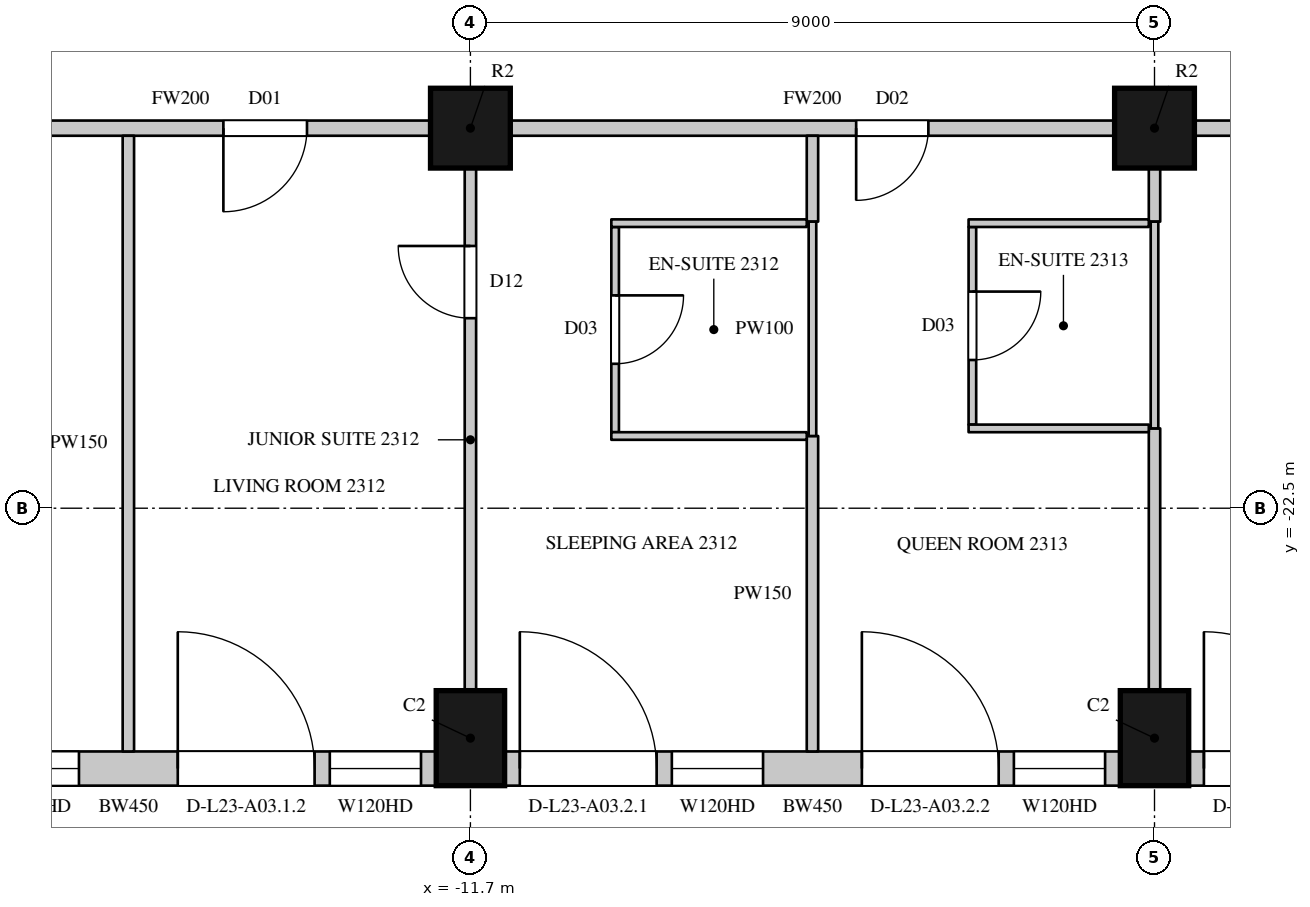
"""IFC4 building model, lengths in metres.
Left out: names, types, materials, properties, quantities, classifications, styles, units other than length and angle.
Written with IfcOpenShell. Run it as: python <this file> out.ifc"""

import sys

from ifc_helpers import new_model, si_unit, direction, frame, frame_2d, origin, origin_2d, place, context, subcontext, project, spatial, rectangle, circle, extrude, element, fill, save


model = new_model("IFC4")
c1 = context("Model", 3, precision=1e-05, world=origin(), true_north=direction((0.0, 1.0)))
c2 = subcontext(c1, "Body", "Model", "MODEL_VIEW")
j1 = project(units=[si_unit("LENGTHUNIT", "METRE"), si_unit("PLANEANGLEUNIT", "RADIAN")], contexts=[c1])
p1 = place(None, origin())
s1 = spatial("IfcSite", under=j1, at=p1, CompositionType="ELEMENT")
p2 = place(p1, origin())
s2 = spatial("IfcBuilding", under=s1, at=p2, CompositionType="ELEMENT")
p3 = place(p2, frame((0.0, 0.0, 113.1)))
s3 = spatial("IfcBuildingStorey", under=s2, at=p3, CompositionType="ELEMENT", Elevation=113.1)
for number, where, z_axis, x_axis in (
    (1, (-11.7, -25.525, 0.0), (0.0, 0.0, 1.0), (1.0, 0.0, 0.0)),
    (2, (-2.7, -25.525, 0.0), (0.0, 0.0, 1.0), (1.0, 0.0, 0.0)),
):
    element("IfcColumn", number, at=place(p3, frame(where, z_axis=z_axis, x_axis=x_axis)), inside=s3, PredefinedType="COLUMN", context=c2, shape_type="SweptSolid", body=[
        extrude(rectangle(XDim=0.9, YDim=1.25, at=origin_2d()), origin(), (0.0, 0.0, 1.0), 3.6),
    ])
for number, where, z_axis, x_axis in (
    (3, (-11.7, -17.5, 0.0), (0.0, 0.0, 1.0), (1.0, 0.0, 0.0)),
    (4, (-2.7, -17.5, 0.0), (0.0, 0.0, 1.0), (1.0, 0.0, 0.0)),
):
    element("IfcColumn", number, at=place(p3, frame(where, z_axis=z_axis, x_axis=x_axis)), inside=s3, PredefinedType="COLUMN", context=c2, shape_type="SweptSolid", body=[
        extrude(circle(Radius=0.525, at=origin_2d()), origin(), (0.0, 0.0, 1.0), 3.6),
    ])
p4 = place(p3, frame((-20.25, -25.925, 0.0), z_axis=(0.0, 0.0, 1.0), x_axis=(1.0, 0.0, 0.0)))
e5 = element("IfcWall", 5, at=p4, inside=s3, PredefinedType="SOLIDWALL", context=c2, shape_type="SweptSolid", body=[
    extrude(rectangle(XDim=8.1, YDim=0.45, at=frame_2d((4.05, 0.0))), origin(), (0.0, 0.0, 1.0), 3.3),
])
p5 = place(p4, frame((0.2, 0.0, 0.0)))
e6 = element("IfcOpeningElement", 6, at=p5, cuts=e5, PredefinedType="OPENING", context=c2, shape_type="SweptSolid", body=[
    extrude(rectangle(XDim=1.8, YDim=2.4, at=frame_2d((0.9, 1.2))), frame((0.0, 0.235, 0.0), z_axis=(0.0, -1.0, 0.0), x_axis=(1.0, 0.0, 0.0)), (0.0, 0.0, 1.0), 0.47),
])
p6 = place(p4, frame((2.2, 0.0, 1.05)))
e7 = element("IfcOpeningElement", 7, at=p6, cuts=e5, PredefinedType="OPENING", context=c2, shape_type="SweptSolid", body=[
    extrude(rectangle(XDim=1.2, YDim=2.0, at=frame_2d((0.6, 1.0))), frame((0.0, 0.235, 0.0), z_axis=(0.0, -1.0, 0.0), x_axis=(1.0, 0.0, 0.0)), (0.0, 0.0, 1.0), 0.47),
])
p7 = place(p4, frame((4.7, 0.0, 0.0)))
e8 = element("IfcOpeningElement", 8, at=p7, cuts=e5, PredefinedType="OPENING", context=c2, shape_type="SweptSolid", body=[
    extrude(rectangle(XDim=1.8, YDim=2.4, at=frame_2d((0.9, 1.2))), frame((0.0, 0.235, 0.0), z_axis=(0.0, -1.0, 0.0), x_axis=(1.0, 0.0, 0.0)), (0.0, 0.0, 1.0), 0.47),
])
p8 = place(p4, frame((6.7, 0.0, 1.05)))
e9 = element("IfcOpeningElement", 9, at=p8, cuts=e5, PredefinedType="OPENING", context=c2, shape_type="SweptSolid", body=[
    extrude(rectangle(XDim=1.2, YDim=2.0, at=frame_2d((0.6, 1.0))), frame((0.0, 0.235, 0.0), z_axis=(0.0, -1.0, 0.0), x_axis=(1.0, 0.0, 0.0)), (0.0, 0.0, 1.0), 0.47),
])
p9 = place(p3, frame((-11.25, -25.925, 0.0), z_axis=(0.0, 0.0, 1.0), x_axis=(1.0, 0.0, 0.0)))
e10 = element("IfcWall", 10, at=p9, inside=s3, PredefinedType="SOLIDWALL", context=c2, shape_type="SweptSolid", body=[
    extrude(rectangle(XDim=8.1, YDim=0.45, at=frame_2d((4.05, 0.0))), origin(), (0.0, 0.0, 1.0), 3.3),
])
p10 = place(p9, frame((0.2, 0.0, 0.0)))
e11 = element("IfcOpeningElement", 11, at=p10, cuts=e10, PredefinedType="OPENING", context=c2, shape_type="SweptSolid", body=[
    extrude(rectangle(XDim=1.8, YDim=2.4, at=frame_2d((0.9, 1.2))), frame((0.0, 0.235, 0.0), z_axis=(0.0, -1.0, 0.0), x_axis=(1.0, 0.0, 0.0)), (0.0, 0.0, 1.0), 0.47),
])
p11 = place(p9, frame((2.2, 0.0, 1.05)))
e12 = element("IfcOpeningElement", 12, at=p11, cuts=e10, PredefinedType="OPENING", context=c2, shape_type="SweptSolid", body=[
    extrude(rectangle(XDim=1.2, YDim=2.0, at=frame_2d((0.6, 1.0))), frame((0.0, 0.235, 0.0), z_axis=(0.0, -1.0, 0.0), x_axis=(1.0, 0.0, 0.0)), (0.0, 0.0, 1.0), 0.47),
])
p12 = place(p9, frame((4.7, 0.0, 0.0)))
e13 = element("IfcOpeningElement", 13, at=p12, cuts=e10, PredefinedType="OPENING", context=c2, shape_type="SweptSolid", body=[
    extrude(rectangle(XDim=1.8, YDim=2.4, at=frame_2d((0.9, 1.2))), frame((0.0, 0.235, 0.0), z_axis=(0.0, -1.0, 0.0), x_axis=(1.0, 0.0, 0.0)), (0.0, 0.0, 1.0), 0.47),
])
p13 = place(p9, frame((6.7, 0.0, 1.05)))
e14 = element("IfcOpeningElement", 14, at=p13, cuts=e10, PredefinedType="OPENING", context=c2, shape_type="SweptSolid", body=[
    extrude(rectangle(XDim=1.2, YDim=2.0, at=frame_2d((0.6, 1.0))), frame((0.0, 0.235, 0.0), z_axis=(0.0, -1.0, 0.0), x_axis=(1.0, 0.0, 0.0)), (0.0, 0.0, 1.0), 0.47),
])
p14 = place(p3, frame((-2.25, -25.925, 0.0), z_axis=(0.0, 0.0, 1.0), x_axis=(1.0, 0.0, 0.0)))
e15 = element("IfcWall", 15, at=p14, inside=s3, PredefinedType="SOLIDWALL", context=c2, shape_type="SweptSolid", body=[
    extrude(rectangle(XDim=8.1, YDim=0.45, at=frame_2d((4.05, 0.0))), origin(), (0.0, 0.0, 1.0), 3.3),
])
p15 = place(p14, frame((0.2, 0.0, 0.0)))
e16 = element("IfcOpeningElement", 16, at=p15, cuts=e15, PredefinedType="OPENING", context=c2, shape_type="SweptSolid", body=[
    extrude(rectangle(XDim=1.8, YDim=2.4, at=frame_2d((0.9, 1.2))), frame((0.0, 0.235, 0.0), z_axis=(0.0, -1.0, 0.0), x_axis=(1.0, 0.0, 0.0)), (0.0, 0.0, 1.0), 0.47),
])
p16 = place(p14, frame((2.2, 0.0, 1.05)))
e17 = element("IfcOpeningElement", 17, at=p16, cuts=e15, PredefinedType="OPENING", context=c2, shape_type="SweptSolid", body=[
    extrude(rectangle(XDim=1.2, YDim=2.0, at=frame_2d((0.6, 1.0))), frame((0.0, 0.235, 0.0), z_axis=(0.0, -1.0, 0.0), x_axis=(1.0, 0.0, 0.0)), (0.0, 0.0, 1.0), 0.47),
])
p17 = place(p14, frame((4.7, 0.0, 0.0)))
e18 = element("IfcOpeningElement", 18, at=p17, cuts=e15, PredefinedType="OPENING", context=c2, shape_type="SweptSolid", body=[
    extrude(rectangle(XDim=1.8, YDim=2.4, at=frame_2d((0.9, 1.2))), frame((0.0, 0.235, 0.0), z_axis=(0.0, -1.0, 0.0), x_axis=(1.0, 0.0, 0.0)), (0.0, 0.0, 1.0), 0.47),
])
p18 = place(p14, frame((6.7, 0.0, 1.05)))
e19 = element("IfcOpeningElement", 19, at=p18, cuts=e15, PredefinedType="OPENING", context=c2, shape_type="SweptSolid", body=[
    extrude(rectangle(XDim=1.2, YDim=2.0, at=frame_2d((0.6, 1.0))), frame((0.0, 0.235, 0.0), z_axis=(0.0, -1.0, 0.0), x_axis=(1.0, 0.0, 0.0)), (0.0, 0.0, 1.0), 0.47),
])
p19 = place(p3, frame((-18.8, -17.5, 0.0), z_axis=(0.0, 0.0, 1.0), x_axis=(1.0, 0.0, 0.0)))
e20 = element("IfcWall", 20, at=p19, inside=s3, PredefinedType="PARTITIONING", context=c2, shape_type="SweptSolid", body=[
    extrude(rectangle(XDim=6.575, YDim=0.2, at=frame_2d((3.288, 0.0))), origin(), (0.0, 0.0, 1.0), 2.75),
])
p20 = place(p19, frame((3.85, 0.0, 0.0)))
e21 = element("IfcOpeningElement", 21, at=p20, cuts=e20, PredefinedType="OPENING", context=c2, shape_type="SweptSolid", body=[
    extrude(rectangle(XDim=1.1, YDim=2.4, at=frame_2d((0.55, 1.2))), frame((0.0, 0.11, 0.0), z_axis=(0.0, -1.0, 0.0), x_axis=(1.0, 0.0, 0.0)), (0.0, 0.0, 1.0), 0.22),
])
p21 = place(p3, frame((-11.175, -17.5, 0.0), z_axis=(0.0, 0.0, 1.0), x_axis=(1.0, 0.0, 0.0)))
e22 = element("IfcWall", 22, at=p21, inside=s3, PredefinedType="PARTITIONING", context=c2, shape_type="SweptSolid", body=[
    extrude(rectangle(XDim=7.95, YDim=0.2, at=frame_2d((3.975, 0.0))), origin(), (0.0, 0.0, 1.0), 2.75),
])
p22 = place(p21, frame((4.55, 0.0, 0.0)))
e23 = element("IfcOpeningElement", 23, at=p22, cuts=e22, PredefinedType="OPENING", context=c2, shape_type="SweptSolid", body=[
    extrude(rectangle(XDim=0.95, YDim=2.2, at=frame_2d((0.475, 1.1))), frame((0.0, 0.11, 0.0), z_axis=(0.0, -1.0, 0.0), x_axis=(1.0, 0.0, 0.0)), (0.0, 0.0, 1.0), 0.22),
])
p23 = place(p3, frame((-2.175, -17.5, 0.0), z_axis=(0.0, 0.0, 1.0), x_axis=(1.0, 0.0, 0.0)))
e24 = element("IfcWall", 24, at=p23, inside=s3, PredefinedType="PARTITIONING", context=c2, shape_type="SweptSolid", body=[
    extrude(rectangle(XDim=7.95, YDim=0.2, at=frame_2d((3.975, 0.0))), origin(), (0.0, 0.0, 1.0), 2.75),
])
p24 = place(p23, frame((1.65, 0.0, 0.0)))
e25 = element("IfcOpeningElement", 25, at=p24, cuts=e24, PredefinedType="OPENING", context=c2, shape_type="SweptSolid", body=[
    extrude(rectangle(XDim=1.1, YDim=2.4, at=frame_2d((0.55, 1.2))), frame((0.0, 0.11, 0.0), z_axis=(0.0, -1.0, 0.0), x_axis=(1.0, 0.0, 0.0)), (0.0, 0.0, 1.0), 0.22),
])
p25 = place(p3, frame((-16.2, -25.7, 0.0), z_axis=(0.0, 0.0, 1.0), x_axis=(0.0, 1.0, 0.0)))
e26 = element("IfcWall", 26, at=p25, inside=s3, PredefinedType="PARTITIONING", context=c2, shape_type="SweptSolid", body=[
    extrude(rectangle(XDim=8.1, YDim=0.15, at=frame_2d((4.05, 0.0))), origin(), (0.0, 0.0, 1.0), 2.65),
])
p26 = place(p3, frame((-11.7, -24.9, 0.0), z_axis=(0.0, 0.0, 1.0), x_axis=(0.0, 1.0, 0.0)))
e27 = element("IfcWall", 27, at=p26, inside=s3, PredefinedType="PARTITIONING", context=c2, shape_type="SweptSolid", body=[
    extrude(rectangle(XDim=6.875, YDim=0.15, at=frame_2d((3.438, 0.0))), origin(), (0.0, 0.0, 1.0), 2.75),
])
p27 = place(p26, frame((4.9, 0.0, 0.0)))
e28 = element("IfcOpeningElement", 28, at=p27, cuts=e27, PredefinedType="OPENING", context=c2, shape_type="SweptSolid", body=[
    extrude(rectangle(XDim=0.95, YDim=2.2, at=frame_2d((0.475, 1.1))), frame((0.0, 0.085, 0.0), z_axis=(0.0, -1.0, 0.0), x_axis=(1.0, 0.0, 0.0)), (0.0, 0.0, 1.0), 0.17),
])
p28 = place(p3, frame((-7.2, -25.7, 0.0), z_axis=(0.0, 0.0, 1.0), x_axis=(0.0, 1.0, 0.0)))
e29 = element("IfcWall", 29, at=p28, inside=s3, PredefinedType="PARTITIONING", context=c2, shape_type="SweptSolid", body=[
    extrude(rectangle(XDim=4.15, YDim=0.15, at=frame_2d((2.075, 0.0))), origin(), (0.0, 0.0, 1.0), 2.65),
])
p29 = place(p3, frame((-7.2, -18.73, 0.0), z_axis=(0.0, 0.0, 1.0), x_axis=(0.0, 1.0, 0.0)))
e30 = element("IfcWall", 30, at=p29, inside=s3, PredefinedType="PARTITIONING", context=c2, shape_type="SweptSolid", body=[
    extrude(rectangle(XDim=1.13, YDim=0.15, at=frame_2d((0.565, 0.0))), origin(), (0.0, 0.0, 1.0), 2.65),
])
p30 = place(p3, frame((-2.7, -24.9, 0.0), z_axis=(0.0, 0.0, 1.0), x_axis=(0.0, 1.0, 0.0)))
e31 = element("IfcWall", 31, at=p30, inside=s3, PredefinedType="PARTITIONING", context=c2, shape_type="SweptSolid", body=[
    extrude(rectangle(XDim=3.45, YDim=0.15, at=frame_2d((1.725, 0.0))), origin(), (0.0, 0.0, 1.0), 2.75),
])
p31 = place(p3, frame((-2.7, -18.73, 0.0), z_axis=(0.0, 0.0, 1.0), x_axis=(0.0, 1.0, 0.0)))
e32 = element("IfcWall", 32, at=p31, inside=s3, PredefinedType="PARTITIONING", context=c2, shape_type="SweptSolid", body=[
    extrude(rectangle(XDim=0.705, YDim=0.15, at=frame_2d((0.353, 0.0))), origin(), (0.0, 0.0, 1.0), 2.75),
])
p32 = place(p3, frame((-9.796, -21.5, 0.0), z_axis=(0.0, 0.0, 1.0), x_axis=(0.0, 1.0, 0.0)))
e33 = element("IfcWall", 33, at=p32, inside=s3, PredefinedType="PARTITIONING", context=c2, shape_type="SweptSolid", body=[
    extrude(rectangle(XDim=2.7, YDim=0.1, at=frame_2d((1.35, 0.0))), origin(), (0.0, 0.0, 1.0), 3.3),
])
p33 = place(p32, frame((0.9, 0.0, 0.0)))
e34 = element("IfcOpeningElement", 34, at=p33, cuts=e33, PredefinedType="OPENING", context=c2, shape_type="SweptSolid", body=[
    extrude(rectangle(XDim=0.9, YDim=2.2, at=frame_2d((0.45, 1.1))), frame((0.0, 0.06, 0.0), z_axis=(0.0, -1.0, 0.0), x_axis=(1.0, 0.0, 0.0)), (0.0, 0.0, 1.0), 0.12),
])
for number, where, z_axis, x_axis in (
    (35, (-9.846, -21.55, 0.0), (0.0, 0.0, 1.0), (1.0, 0.0, 0.0)),
    (36, (-9.846, -18.75, 0.0), (0.0, 0.0, 1.0), (1.0, 0.0, 0.0)),
):
    element("IfcWall", number, at=place(p3, frame(where, z_axis=z_axis, x_axis=x_axis)), inside=s3, PredefinedType="PARTITIONING", context=c2, shape_type="SweptSolid", body=[
        extrude(rectangle(XDim=2.571, YDim=0.1, at=frame_2d((1.286, 0.0))), origin(), (0.0, 0.0, 1.0), 3.3),
    ])
p34 = place(p3, frame((-7.2, -21.55, 0.0), z_axis=(0.0, 0.0, 1.0), x_axis=(0.0, 1.0, 0.0)))
e37 = element("IfcWall", 37, at=p34, inside=s3, PredefinedType="PARTITIONING", context=c2, shape_type="SweptSolid", body=[
    extrude(rectangle(XDim=2.82, YDim=0.1, at=frame_2d((1.41, 0.0))), origin(), (0.0, 0.0, 1.0), 2.65),
])
p35 = place(p3, frame((-5.096, -21.4, 0.0), z_axis=(0.0, 0.0, 1.0), x_axis=(0.0, 1.0, 0.0)))
e38 = element("IfcWall", 38, at=p35, inside=s3, PredefinedType="PARTITIONING", context=c2, shape_type="SweptSolid", body=[
    extrude(rectangle(XDim=2.6, YDim=0.1, at=frame_2d((1.3, 0.0))), origin(), (0.0, 0.0, 1.0), 3.3),
])
p36 = place(p35, frame((0.85, 0.0, 0.0)))
e39 = element("IfcOpeningElement", 39, at=p36, cuts=e38, PredefinedType="OPENING", context=c2, shape_type="SweptSolid", body=[
    extrude(rectangle(XDim=0.9, YDim=2.2, at=frame_2d((0.45, 1.1))), frame((0.0, 0.06, 0.0), z_axis=(0.0, -1.0, 0.0), x_axis=(1.0, 0.0, 0.0)), (0.0, 0.0, 1.0), 0.12),
])
for number, where, z_axis, x_axis in (
    (40, (-5.146, -21.45, 0.0), (0.0, 0.0, 1.0), (1.0, 0.0, 0.0)),
    (41, (-5.146, -18.75, 0.0), (0.0, 0.0, 1.0), (1.0, 0.0, 0.0)),
):
    element("IfcWall", number, at=place(p3, frame(where, z_axis=z_axis, x_axis=x_axis)), inside=s3, PredefinedType="PARTITIONING", context=c2, shape_type="SweptSolid", body=[
        extrude(rectangle(XDim=2.371, YDim=0.1, at=frame_2d((1.186, 0.0))), origin(), (0.0, 0.0, 1.0), 3.3),
    ])
p37 = place(p3, frame((-2.7, -21.45, 0.0), z_axis=(0.0, 0.0, 1.0), x_axis=(0.0, 1.0, 0.0)))
e42 = element("IfcWall", 42, at=p37, inside=s3, PredefinedType="PARTITIONING", context=c2, shape_type="SweptSolid", body=[
    extrude(rectangle(XDim=2.72, YDim=0.1, at=frame_2d((1.36, 0.0))), origin(), (0.0, 0.0, 1.0), 2.75),
])
p38 = place(p6, origin())
e43 = element("IfcWindow", 43, at=p38, inside=s3, PartitioningType="SINGLE_PANEL", PredefinedType="WINDOW", context=c2, shape_type="SweptSolid", body=[
    extrude(rectangle(XDim=1.2, YDim=2.0, at=frame_2d((0.6, 1.0))), frame((0.0, 0.135, 0.0), z_axis=(0.0, -1.0, 0.0), x_axis=(1.0, 0.0, 0.0)), (0.0, 0.0, 1.0), 0.06),
])
fill(e7, e43)
p39 = place(p7, origin())
e44 = element("IfcDoor", 44, at=p39, inside=s3, OperationType="SLIDING_TO_LEFT", PredefinedType="DOOR", context=c2, shape_type="SweptSolid", body=[
    extrude(rectangle(XDim=1.8, YDim=2.4, at=frame_2d((0.9, 1.2))), frame((0.0, 0.13, 0.0), z_axis=(0.0, -1.0, 0.0), x_axis=(1.0, 0.0, 0.0)), (0.0, 0.0, 1.0), 0.05),
])
fill(e8, e44)
p40 = place(p8, origin())
e45 = element("IfcWindow", 45, at=p40, inside=s3, PartitioningType="SINGLE_PANEL", PredefinedType="WINDOW", context=c2, shape_type="SweptSolid", body=[
    extrude(rectangle(XDim=1.2, YDim=2.0, at=frame_2d((0.6, 1.0))), frame((0.0, 0.135, 0.0), z_axis=(0.0, -1.0, 0.0), x_axis=(1.0, 0.0, 0.0)), (0.0, 0.0, 1.0), 0.06),
])
fill(e9, e45)
p41 = place(p10, origin())
e46 = element("IfcDoor", 46, at=p41, inside=s3, OperationType="SLIDING_TO_LEFT", PredefinedType="DOOR", context=c2, shape_type="SweptSolid", body=[
    extrude(rectangle(XDim=1.8, YDim=2.4, at=frame_2d((0.9, 1.2))), frame((0.0, 0.13, 0.0), z_axis=(0.0, -1.0, 0.0), x_axis=(1.0, 0.0, 0.0)), (0.0, 0.0, 1.0), 0.05),
])
fill(e11, e46)
p42 = place(p11, origin())
e47 = element("IfcWindow", 47, at=p42, inside=s3, PartitioningType="SINGLE_PANEL", PredefinedType="WINDOW", context=c2, shape_type="SweptSolid", body=[
    extrude(rectangle(XDim=1.2, YDim=2.0, at=frame_2d((0.6, 1.0))), frame((0.0, 0.135, 0.0), z_axis=(0.0, -1.0, 0.0), x_axis=(1.0, 0.0, 0.0)), (0.0, 0.0, 1.0), 0.06),
])
fill(e12, e47)
p43 = place(p12, origin())
e48 = element("IfcDoor", 48, at=p43, inside=s3, OperationType="SLIDING_TO_LEFT", PredefinedType="DOOR", context=c2, shape_type="SweptSolid", body=[
    extrude(rectangle(XDim=1.8, YDim=2.4, at=frame_2d((0.9, 1.2))), frame((0.0, 0.13, 0.0), z_axis=(0.0, -1.0, 0.0), x_axis=(1.0, 0.0, 0.0)), (0.0, 0.0, 1.0), 0.05),
])
fill(e13, e48)
p44 = place(p13, origin())
e49 = element("IfcWindow", 49, at=p44, inside=s3, PartitioningType="SINGLE_PANEL", PredefinedType="WINDOW", context=c2, shape_type="SweptSolid", body=[
    extrude(rectangle(XDim=1.2, YDim=2.0, at=frame_2d((0.6, 1.0))), frame((0.0, 0.135, 0.0), z_axis=(0.0, -1.0, 0.0), x_axis=(1.0, 0.0, 0.0)), (0.0, 0.0, 1.0), 0.06),
])
fill(e14, e49)
p45 = place(p15, origin())
e50 = element("IfcDoor", 50, at=p45, inside=s3, OperationType="SLIDING_TO_LEFT", PredefinedType="DOOR", context=c2, shape_type="SweptSolid", body=[
    extrude(rectangle(XDim=1.8, YDim=2.4, at=frame_2d((0.9, 1.2))), frame((0.0, 0.13, 0.0), z_axis=(0.0, -1.0, 0.0), x_axis=(1.0, 0.0, 0.0)), (0.0, 0.0, 1.0), 0.05),
])
fill(e16, e50)
p46 = place(p20, origin())
e51 = element("IfcDoor", 51, at=p46, inside=s3, OperationType="SINGLE_SWING_RIGHT", PredefinedType="DOOR", context=c2, shape_type="SweptSolid", body=[
    extrude(rectangle(XDim=1.1, YDim=2.4, at=frame_2d((0.55, 1.2))), frame((0.0, 0.025, 0.0), z_axis=(0.0, -1.0, 0.0), x_axis=(1.0, 0.0, 0.0)), (0.0, 0.0, 1.0), 0.05),
])
fill(e21, e51)
p47 = place(p27, origin())
e52 = element("IfcDoor", 52, at=p47, inside=s3, OperationType="SINGLE_SWING_RIGHT", PredefinedType="DOOR", context=c2, shape_type="SweptSolid", body=[
    extrude(rectangle(XDim=0.95, YDim=2.2, at=frame_2d((0.475, 1.1))), frame((0.0, 0.025, 0.0), z_axis=(0.0, -1.0, 0.0), x_axis=(1.0, 0.0, 0.0)), (0.0, 0.0, 1.0), 0.05),
])
fill(e28, e52)
p48 = place(p33, origin())
e53 = element("IfcDoor", 53, at=p48, inside=s3, OperationType="SINGLE_SWING_LEFT", PredefinedType="DOOR", context=c2, shape_type="SweptSolid", body=[
    extrude(rectangle(XDim=0.9, YDim=2.2, at=frame_2d((0.45, 1.1))), frame((0.0, 0.025, 0.0), z_axis=(0.0, -1.0, 0.0), x_axis=(1.0, 0.0, 0.0)), (0.0, 0.0, 1.0), 0.05),
])
fill(e34, e53)
p49 = place(p22, origin())
e54 = element("IfcDoor", 54, at=p49, inside=s3, OperationType="SINGLE_SWING_RIGHT", PredefinedType="DOOR", context=c2, shape_type="SweptSolid", body=[
    extrude(rectangle(XDim=0.95, YDim=2.2, at=frame_2d((0.475, 1.1))), frame((0.0, 0.025, 0.0), z_axis=(0.0, -1.0, 0.0), x_axis=(1.0, 0.0, 0.0)), (0.0, 0.0, 1.0), 0.05),
])
fill(e23, e54)
p50 = place(p36, origin())
e55 = element("IfcDoor", 55, at=p50, inside=s3, OperationType="SINGLE_SWING_LEFT", PredefinedType="DOOR", context=c2, shape_type="SweptSolid", body=[
    extrude(rectangle(XDim=0.9, YDim=2.2, at=frame_2d((0.45, 1.1))), frame((0.0, 0.025, 0.0), z_axis=(0.0, -1.0, 0.0), x_axis=(1.0, 0.0, 0.0)), (0.0, 0.0, 1.0), 0.05),
])
fill(e39, e55)
save(model, sys.argv[1])
